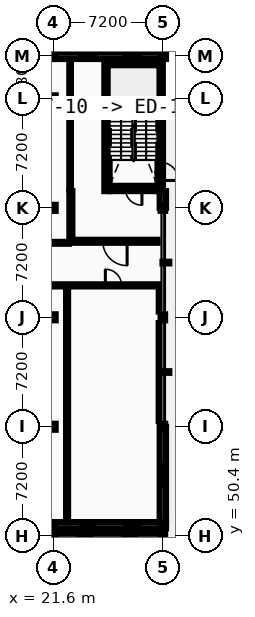
"""IFC4 building model, lengths in metres.
Left out: names, types, materials, properties, quantities, classifications, styles, units other than length and angle.
Written with IfcOpenShell. Run it as: python <this file> out.ifc"""

import sys

from ifc_helpers import new_model, si_unit, direction, frame, frame_2d, origin, origin_2d, place, context, subcontext, project, spatial, rectangle, i_section, extrude, element, fill, save


model = new_model("IFC4")
c1 = context("Model", 3, precision=1e-05, world=origin(), true_north=direction((0.0, 1.0)))
c2 = subcontext(c1, "Body", "Model", "MODEL_VIEW")
j1 = project(units=[si_unit("LENGTHUNIT", "METRE"), si_unit("PLANEANGLEUNIT", "RADIAN")], contexts=[c1])
p1 = place(None, origin())
s1 = spatial("IfcSite", under=j1, at=p1, CompositionType="ELEMENT")
p2 = place(p1, origin())
s2 = spatial("IfcBuilding", under=s1, at=p2, CompositionType="ELEMENT")
p3 = place(p2, origin())
s3 = spatial("IfcBuildingStorey", under=s2, at=p3, CompositionType="ELEMENT", Elevation=0.0)
p4 = place(p3, frame((21.6, 50.4, 0.0), z_axis=(0.0, 0.0, 1.0), x_axis=(1.0, 0.0, 0.0)))
e1 = element("IfcColumn", 1, at=p4, inside=s3, PredefinedType="COLUMN", context=c2, shape_type="SweptSolid", body=[
    extrude(i_section(OverallWidth=0.3, OverallDepth=0.45, WebThickness=0.014, FlangeThickness=0.026, FilletRadius=0.027, at=origin_2d()), origin(), (0.0, 0.0, 1.0), 5.2),
])
p5 = place(p3, frame((21.6, 51.12, 0.0), z_axis=(0.0, 0.0, 1.0), x_axis=(1.0, 0.0, 0.0)))
e2 = element("IfcColumn", 2, at=p5, inside=s3, PredefinedType="COLUMN", context=c2, shape_type="SweptSolid", body=[
    extrude(i_section(OverallWidth=0.3, OverallDepth=0.36, WebThickness=0.012, FlangeThickness=0.022, FilletRadius=0.027, at=origin_2d()), origin(), (0.0, 0.0, 1.0), 5.2),
])
for number, where, z_axis, x_axis in (
    (3, (21.6, 57.6, 0.0), (0.0, 0.0, 1.0), (1.0, 0.0, 0.0)),
    (4, (21.6, 64.8, 0.0), (0.0, 0.0, 1.0), (1.0, 0.0, 0.0)),
    (5, (21.6, 72.0, 0.0), (0.0, 0.0, 1.0), (1.0, 0.0, 0.0)),
    (6, (21.6, 79.2, 0.0), (0.0, 0.0, 1.0), (1.0, 0.0, 0.0)),
    (7, (21.6, 82.0, 0.0), (0.0, 0.0, 1.0), (1.0, 0.0, 0.0)),
):
    element("IfcColumn", number, at=place(p3, frame(where, z_axis=z_axis, x_axis=x_axis)), inside=s3, PredefinedType="COLUMN", context=c2, shape_type="SweptSolid", body=[
        extrude(i_section(OverallWidth=0.3, OverallDepth=0.4, WebThickness=0.013, FlangeThickness=0.024, FilletRadius=0.027, at=origin_2d()), origin(), (0.0, 0.0, 1.0), 5.2),
    ])
p6 = place(p3, frame((28.8, 50.4, 0.0), z_axis=(0.0, 0.0, 1.0), x_axis=(1.0, 0.0, 0.0)))
e8 = element("IfcColumn", 8, at=p6, inside=s3, PredefinedType="COLUMN", context=c2, shape_type="SweptSolid", body=[
    extrude(i_section(OverallWidth=0.3, OverallDepth=0.45, WebThickness=0.014, FlangeThickness=0.026, FilletRadius=0.027, at=origin_2d()), origin(), (0.0, 0.0, 1.0), 5.2),
])
p7 = place(p3, frame((28.8, 51.12, 0.0), z_axis=(0.0, 0.0, 1.0), x_axis=(1.0, 0.0, 0.0)))
e9 = element("IfcColumn", 9, at=p7, inside=s3, PredefinedType="COLUMN", context=c2, shape_type="SweptSolid", body=[
    extrude(i_section(OverallWidth=0.3, OverallDepth=0.36, WebThickness=0.012, FlangeThickness=0.022, FilletRadius=0.027, at=origin_2d()), origin(), (0.0, 0.0, 1.0), 5.2),
])
for number, where, z_axis, x_axis in (
    (10, (28.8, 57.6, 0.0), (0.0, 0.0, 1.0), (1.0, 0.0, 0.0)),
    (11, (28.8, 64.8, 0.0), (0.0, 0.0, 1.0), (1.0, 0.0, 0.0)),
    (12, (28.8, 72.0, 0.0), (0.0, 0.0, 1.0), (1.0, 0.0, 0.0)),
    (13, (28.8, 82.0, 0.0), (0.0, 0.0, 1.0), (1.0, 0.0, 0.0)),
):
    element("IfcColumn", number, at=place(p3, frame(where, z_axis=z_axis, x_axis=x_axis)), inside=s3, PredefinedType="COLUMN", context=c2, shape_type="SweptSolid", body=[
        extrude(i_section(OverallWidth=0.3, OverallDepth=0.4, WebThickness=0.013, FlangeThickness=0.024, FilletRadius=0.027, at=origin_2d()), origin(), (0.0, 0.0, 1.0), 5.2),
    ])
p8 = place(p3, frame((28.8, 50.4, 0.0), z_axis=(0.0, 0.0, 1.0), x_axis=(-1.0, 0.0, 0.0)))
e14 = element("IfcWall", 14, at=p8, inside=s3, PredefinedType="STANDARD", context=c2, shape_type="SweptSolid", body=[
    extrude(rectangle(XDim=7.31, YDim=0.42, at=frame_2d((3.655, 0.0))), origin(), (0.0, 0.0, 1.0), 4.665),
])
p9 = place(p8, frame((1.743, 0.0, 1.1)))
e15 = element("IfcOpeningElement", 15, at=p9, cuts=e14, PredefinedType="OPENING", context=c2, shape_type="SweptSolid", body=[
    extrude(rectangle(XDim=0.9, YDim=1.6, at=frame_2d((0.45, 0.8))), frame((0.0, 0.22, 0.0), z_axis=(0.0, -1.0, 0.0), x_axis=(1.0, 0.0, 0.0)), (0.0, 0.0, 1.0), 0.44),
])
p10 = place(p8, frame((4.667, 0.0, 1.1)))
e16 = element("IfcOpeningElement", 16, at=p10, cuts=e14, PredefinedType="OPENING", context=c2, shape_type="SweptSolid", body=[
    extrude(rectangle(XDim=0.9, YDim=1.6, at=frame_2d((0.45, 0.8))), frame((0.0, 0.22, 0.0), z_axis=(0.0, -1.0, 0.0), x_axis=(1.0, 0.0, 0.0)), (0.0, 0.0, 1.0), 0.44),
])
p11 = place(p3, frame((14.4, 51.12, 0.0), z_axis=(0.0, 0.0, 1.0), x_axis=(1.0, 0.0, 0.0)))
e17 = element("IfcWall", 17, at=p11, inside=s3, PredefinedType="STANDARD", context=c2, shape_type="SweptSolid", body=[
    extrude(rectangle(XDim=7.2, YDim=0.42, at=frame_2d((3.6, 0.0))), origin(), (0.0, 0.0, 1.0), 4.635),
])
p12 = place(p11, frame((1.679, 0.0, 0.95)))
e18 = element("IfcOpeningElement", 18, at=p12, cuts=e17, PredefinedType="OPENING", context=c2, shape_type="SweptSolid", body=[
    extrude(rectangle(XDim=0.962, YDim=1.404, at=frame_2d((0.481, 0.702))), frame((0.0, 0.22, 0.0), z_axis=(0.0, -1.0, 0.0), x_axis=(1.0, 0.0, 0.0)), (0.0, 0.0, 1.0), 0.44),
])
p13 = place(p11, frame((4.559, 0.0, 0.95)))
e19 = element("IfcOpeningElement", 19, at=p13, cuts=e17, PredefinedType="OPENING", context=c2, shape_type="SweptSolid", body=[
    extrude(rectangle(XDim=0.962, YDim=1.404, at=frame_2d((0.481, 0.702))), frame((0.0, 0.22, 0.0), z_axis=(0.0, -1.0, 0.0), x_axis=(1.0, 0.0, 0.0)), (0.0, 0.0, 1.0), 0.44),
])
p14 = place(p3, frame((21.6, 51.12, 0.0), z_axis=(0.0, 0.0, 1.0), x_axis=(1.0, 0.0, 0.0)))
e20 = element("IfcWall", 20, at=p14, inside=s3, PredefinedType="STANDARD", context=c2, shape_type="SweptSolid", body=[
    extrude(rectangle(XDim=7.41, YDim=0.42, at=frame_2d((3.705, 0.0))), origin(), (0.0, 0.0, 1.0), 4.635),
])
p15 = place(p14, frame((1.725, 0.0, 0.95)))
e21 = element("IfcOpeningElement", 21, at=p15, cuts=e20, PredefinedType="OPENING", context=c2, shape_type="SweptSolid", body=[
    extrude(rectangle(XDim=0.996, YDim=1.404, at=frame_2d((0.498, 0.702))), frame((0.0, 0.22, 0.0), z_axis=(0.0, -1.0, 0.0), x_axis=(1.0, 0.0, 0.0)), (0.0, 0.0, 1.0), 0.44),
])
p16 = place(p14, frame((4.689, 0.0, 0.95)))
e22 = element("IfcOpeningElement", 22, at=p16, cuts=e20, PredefinedType="OPENING", context=c2, shape_type="SweptSolid", body=[
    extrude(rectangle(XDim=0.996, YDim=1.404, at=frame_2d((0.498, 0.702))), frame((0.0, 0.22, 0.0), z_axis=(0.0, -1.0, 0.0), x_axis=(1.0, 0.0, 0.0)), (0.0, 0.0, 1.0), 0.44),
])
p17 = place(p3, frame((21.6, 82.0, 0.0), z_axis=(0.0, 0.0, 1.0), x_axis=(-1.0, 0.0, 0.0)))
e23 = element("IfcWall", 23, at=p17, inside=s3, PredefinedType="STANDARD", context=c2, shape_type="SweptSolid", body=[
    extrude(rectangle(XDim=7.2, YDim=0.42, at=frame_2d((3.6, 0.0))), origin(), (0.0, 0.0, 1.0), 4.635),
])
p18 = place(p17, frame((1.611, 0.0, 0.95)))
e24 = element("IfcOpeningElement", 24, at=p18, cuts=e23, PredefinedType="OPENING", context=c2, shape_type="SweptSolid", body=[
    extrude(rectangle(XDim=1.098, YDim=1.404, at=frame_2d((0.549, 0.702))), frame((0.0, 0.22, 0.0), z_axis=(0.0, -1.0, 0.0), x_axis=(1.0, 0.0, 0.0)), (0.0, 0.0, 1.0), 0.44),
])
p19 = place(p17, frame((4.491, 0.0, 0.95)))
e25 = element("IfcOpeningElement", 25, at=p19, cuts=e23, PredefinedType="OPENING", context=c2, shape_type="SweptSolid", body=[
    extrude(rectangle(XDim=1.098, YDim=1.404, at=frame_2d((0.549, 0.702))), frame((0.0, 0.22, 0.0), z_axis=(0.0, -1.0, 0.0), x_axis=(1.0, 0.0, 0.0)), (0.0, 0.0, 1.0), 0.44),
])
p20 = place(p3, frame((29.01, 82.0, 0.0), z_axis=(0.0, 0.0, 1.0), x_axis=(-1.0, 0.0, 0.0)))
e26 = element("IfcWall", 26, at=p20, inside=s3, PredefinedType="STANDARD", context=c2, shape_type="SweptSolid", body=[
    extrude(rectangle(XDim=7.41, YDim=0.42, at=frame_2d((3.705, 0.0))), origin(), (0.0, 0.0, 1.0), 4.635),
])
p21 = place(p20, frame((1.657, 0.0, 0.95)))
e27 = element("IfcOpeningElement", 27, at=p21, cuts=e26, PredefinedType="OPENING", context=c2, shape_type="SweptSolid", body=[
    extrude(rectangle(XDim=1.132, YDim=1.404, at=frame_2d((0.566, 0.702))), frame((0.0, 0.22, 0.0), z_axis=(0.0, -1.0, 0.0), x_axis=(1.0, 0.0, 0.0)), (0.0, 0.0, 1.0), 0.44),
])
p22 = place(p20, frame((4.621, 0.0, 0.95)))
e28 = element("IfcOpeningElement", 28, at=p22, cuts=e26, PredefinedType="OPENING", context=c2, shape_type="SweptSolid", body=[
    extrude(rectangle(XDim=1.132, YDim=1.404, at=frame_2d((0.566, 0.702))), frame((0.0, 0.22, 0.0), z_axis=(0.0, -1.0, 0.0), x_axis=(1.0, 0.0, 0.0)), (0.0, 0.0, 1.0), 0.44),
])
p23 = place(p3, frame((28.8, 51.33, 0.0), z_axis=(0.0, 0.0, 1.0), x_axis=(0.0, 1.0, 0.0)))
e29 = element("IfcWall", 29, at=p23, inside=s3, PredefinedType="STANDARD", context=c2, shape_type="SweptSolid", body=[
    extrude(rectangle(XDim=6.27, YDim=0.42, at=frame_2d((3.135, 0.0))), origin(), (0.0, 0.0, 1.0), 4.565),
])
p24 = place(p23, frame((2.385, 0.0, 1.05)))
e30 = element("IfcOpeningElement", 30, at=p24, cuts=e29, PredefinedType="OPENING", context=c2, shape_type="SweptSolid", body=[
    extrude(rectangle(XDim=1.5, YDim=1.5, at=frame_2d((0.75, 0.75))), frame((0.0, 0.22, 0.0), z_axis=(0.0, -1.0, 0.0), x_axis=(1.0, 0.0, 0.0)), (0.0, 0.0, 1.0), 0.44),
])
p25 = place(p3, frame((28.8, 72.0, 0.0), z_axis=(0.0, 0.0, 1.0), x_axis=(0.0, 1.0, 0.0)))
e31 = element("IfcWall", 31, at=p25, inside=s3, PredefinedType="STANDARD", context=c2, shape_type="SweptSolid", body=[
    extrude(rectangle(XDim=1.1, YDim=0.42, at=frame_2d((0.55, 0.0))), origin(), (0.0, 0.0, 1.0), 4.94),
])
p26 = place(p3, frame((25.3, 73.275, 0.0), z_axis=(0.0, 0.0, 1.0), x_axis=(1.0, 0.0, 0.0)))
e32 = element("IfcWall", 32, at=p26, inside=s3, PredefinedType="SHEAR", context=c2, shape_type="SweptSolid", body=[
    extrude(rectangle(XDim=3.15, YDim=0.35, at=frame_2d((1.575, 0.0))), origin(), (0.0, 0.0, 1.0), 4.94),
])
p27 = place(p26, frame((1.025, 0.0, 0.0)))
e33 = element("IfcOpeningElement", 33, at=p27, cuts=e32, PredefinedType="OPENING", context=c2, shape_type="SweptSolid", body=[
    extrude(rectangle(XDim=1.1, YDim=2.15, at=frame_2d((0.55, 1.075))), frame((0.0, 0.185, 0.0), z_axis=(0.0, -1.0, 0.0), x_axis=(1.0, 0.0, 0.0)), (0.0, 0.0, 1.0), 0.37),
])
p28 = place(p3, frame((25.3, 81.425, 0.0), z_axis=(0.0, 0.0, 1.0), x_axis=(1.0, 0.0, 0.0)))
e34 = element("IfcWall", 34, at=p28, inside=s3, PredefinedType="SHEAR", context=c2, shape_type="SweptSolid", body=[
    extrude(rectangle(XDim=3.15, YDim=0.35, at=frame_2d((1.575, 0.0))), origin(), (0.0, 0.0, 1.0), 4.94),
])
p29 = place(p3, frame((25.125, 73.1, 0.0), z_axis=(0.0, 0.0, 1.0), x_axis=(0.0, 1.0, 0.0)))
e35 = element("IfcWall", 35, at=p29, inside=s3, PredefinedType="SHEAR", context=c2, shape_type="SweptSolid", body=[
    extrude(rectangle(XDim=8.69, YDim=0.35, at=frame_2d((4.345, 0.0))), origin(), (0.0, 0.0, 1.0), 4.94),
])
p30 = place(p3, frame((28.625, 73.1, 0.0), z_axis=(0.0, 0.0, 1.0), x_axis=(0.0, 1.0, 0.0)))
e36 = element("IfcWall", 36, at=p30, inside=s3, PredefinedType="SHEAR", context=c2, shape_type="SweptSolid", body=[
    extrude(rectangle(XDim=8.69, YDim=0.35, at=frame_2d((4.345, 0.0))), origin(), (0.0, 0.0, 1.0), 4.94),
])
p31 = place(p30, frame((0.7, 0.0, 0.0)))
e37 = element("IfcOpeningElement", 37, at=p31, cuts=e36, PredefinedType="OPENING", context=c2, shape_type="SweptSolid", body=[
    extrude(rectangle(XDim=1.2, YDim=2.15, at=frame_2d((0.6, 1.075))), frame((0.0, 0.185, 0.0), z_axis=(0.0, -1.0, 0.0), x_axis=(1.0, 0.0, 0.0)), (0.0, 0.0, 1.0), 0.37),
])
p32 = place(p3, frame((22.85, 69.8, 0.0), z_axis=(0.0, 0.0, 1.0), x_axis=(1.0, 0.0, 0.0)))
e38 = element("IfcWall", 38, at=p32, inside=s3, PredefinedType="PARTITIONING", context=c2, shape_type="SweptSolid", body=[
    extrude(rectangle(XDim=5.6, YDim=0.2, at=frame_2d((2.8, 0.0))), origin(), (0.0, 0.0, 1.0), 4.94),
])
p33 = place(p32, frame((2.0, 0.0, 0.0)))
e39 = element("IfcOpeningElement", 39, at=p33, cuts=e38, PredefinedType="OPENING", context=c2, shape_type="SweptSolid", body=[
    extrude(rectangle(XDim=1.6, YDim=2.2, at=frame_2d((0.8, 1.1))), frame((0.0, 0.11, 0.0), z_axis=(0.0, -1.0, 0.0), x_axis=(1.0, 0.0, 0.0)), (0.0, 0.0, 1.0), 0.22),
])
p34 = place(p3, frame((22.75, 69.9, 0.0), z_axis=(0.0, 0.0, 1.0), x_axis=(0.0, 1.0, 0.0)))
e40 = element("IfcWall", 40, at=p34, inside=s3, PredefinedType="PARTITIONING", context=c2, shape_type="SweptSolid", body=[
    extrude(rectangle(XDim=3.2, YDim=0.2, at=frame_2d((1.6, 0.0))), origin(), (0.0, 0.0, 1.0), 4.94),
])
p35 = place(p3, frame((14.7, 66.9, 0.0), z_axis=(0.0, 0.0, 1.0), x_axis=(1.0, 0.0, 0.0)))
e41 = element("IfcWall", 41, at=p35, inside=s3, PredefinedType="PARTITIONING", context=c2, shape_type="SweptSolid", body=[
    extrude(rectangle(XDim=13.9, YDim=0.142, at=frame_2d((6.95, 0.0))), origin(), (0.0, 0.0, 1.0), 4.94),
])
p36 = place(p35, frame((10.319, 0.0, 0.0)))
e42 = element("IfcOpeningElement", 42, at=p36, cuts=e41, PredefinedType="OPENING", context=c2, shape_type="SweptSolid", body=[
    extrude(rectangle(XDim=1.062, YDim=2.096, at=frame_2d((0.531, 1.048))), frame((0.0, 0.081, 0.0), z_axis=(0.0, -1.0, 0.0), x_axis=(1.0, 0.0, 0.0)), (0.0, 0.0, 1.0), 0.162),
])
p37 = place(p35, frame((3.356, 0.0, 0.0)))
e43 = element("IfcOpeningElement", 43, at=p37, cuts=e41, PredefinedType="OPENING", context=c2, shape_type="SweptSolid", body=[
    extrude(rectangle(XDim=1.088, YDim=2.096, at=frame_2d((0.544, 1.048))), frame((0.0, 0.081, 0.0), z_axis=(0.0, -1.0, 0.0), x_axis=(1.0, 0.0, 0.0)), (0.0, 0.0, 1.0), 0.162),
])
p38 = place(p3, frame((6.45, 69.7, 0.0), z_axis=(0.0, 0.0, 1.0), x_axis=(1.0, 0.0, 0.0)))
e44 = element("IfcWall", 44, at=p38, inside=s3, PredefinedType="PARTITIONING", context=c2, shape_type="SweptSolid", body=[
    extrude(rectangle(XDim=16.18, YDim=0.125, at=frame_2d((8.09, 0.0))), origin(), (0.0, 0.0, 1.0), 4.94),
])
p39 = place(p38, frame((12.35, 0.0, 0.0)))
e45 = element("IfcOpeningElement", 45, at=p39, cuts=e44, PredefinedType="OPENING", context=c2, shape_type="SweptSolid", body=[
    extrude(rectangle(XDim=0.9, YDim=2.1, at=frame_2d((0.45, 1.05))), frame((0.0, 0.073, 0.0), z_axis=(0.0, -1.0, 0.0), x_axis=(1.0, 0.0, 0.0)), (0.0, 0.0, 1.0), 0.145),
])
p40 = place(p38, frame((9.95, 0.0, 0.0)))
e46 = element("IfcOpeningElement", 46, at=p40, cuts=e44, PredefinedType="OPENING", context=c2, shape_type="SweptSolid", body=[
    extrude(rectangle(XDim=1.5, YDim=2.2, at=frame_2d((0.75, 1.1))), frame((0.0, 0.073, 0.0), z_axis=(0.0, -1.0, 0.0), x_axis=(1.0, 0.0, 0.0)), (0.0, 0.0, 1.0), 0.145),
])
p41 = place(p38, frame((2.625, 0.0, 0.0)))
e47 = element("IfcOpeningElement", 47, at=p41, cuts=e44, PredefinedType="OPENING", context=c2, shape_type="SweptSolid", body=[
    extrude(rectangle(XDim=1.5, YDim=2.2, at=frame_2d((0.75, 1.1))), frame((0.0, 0.073, 0.0), z_axis=(0.0, -1.0, 0.0), x_axis=(1.0, 0.0, 0.0)), (0.0, 0.0, 1.0), 0.145),
])
p42 = place(p3, frame((22.5, 51.32, 0.0), z_axis=(0.0, 0.0, 1.0), x_axis=(0.0, 1.0, 0.0)))
e48 = element("IfcWall", 48, at=p42, inside=s3, PredefinedType="PARTITIONING", context=c2, shape_type="SweptSolid", body=[
    extrude(rectangle(XDim=15.509, YDim=0.135, at=frame_2d((7.754, 0.0))), origin(), (0.0, 0.0, 1.0), 4.94),
])
p43 = place(p3, frame((22.7, 73.2, 0.0), z_axis=(0.0, 0.0, 1.0), x_axis=(0.0, 1.0, 0.0)))
e49 = element("IfcWall", 49, at=p43, inside=s3, PredefinedType="PARTITIONING", context=c2, shape_type="SweptSolid", body=[
    extrude(rectangle(XDim=8.6, YDim=0.11, at=frame_2d((4.3, 0.0))), origin(), (0.0, 0.0, 1.0), 4.94),
])
p44 = place(p3, frame((28.6, 57.98, 0.0), z_axis=(0.0, 0.0, 1.0), x_axis=(0.0, 1.0, 0.0)))
e50 = element("IfcWall", 50, at=p44, inside=s3, PredefinedType="PARTITIONING", context=c2, shape_type="SweptSolid", body=[
    extrude(rectangle(XDim=6.44, YDim=0.15, at=frame_2d((3.22, 0.0))), origin(), (0.0, 0.0, 1.0), 4.565),
])
p45 = place(p3, frame((28.6, 65.18, 0.0), z_axis=(0.0, 0.0, 1.0), x_axis=(0.0, 1.0, 0.0)))
e51 = element("IfcWall", 51, at=p45, inside=s3, PredefinedType="PARTITIONING", context=c2, shape_type="SweptSolid", body=[
    extrude(rectangle(XDim=1.649, YDim=0.142, at=frame_2d((0.825, 0.0))), origin(), (0.0, 0.0, 1.0), 4.565),
])
p46 = place(p9, origin())
e52 = element("IfcWindow", 52, at=p46, inside=s3, PartitioningType="SINGLE_PANEL", PredefinedType="WINDOW", context=c2, shape_type="SweptSolid", body=[
    extrude(rectangle(XDim=0.9, YDim=1.6, at=frame_2d((0.45, 0.8))), frame((0.0, 0.03, 0.0), z_axis=(0.0, -1.0, 0.0), x_axis=(1.0, 0.0, 0.0)), (0.0, 0.0, 1.0), 0.06),
])
fill(e15, e52)
p47 = place(p10, origin())
e53 = element("IfcWindow", 53, at=p47, inside=s3, PartitioningType="SINGLE_PANEL", PredefinedType="WINDOW", context=c2, shape_type="SweptSolid", body=[
    extrude(rectangle(XDim=0.9, YDim=1.6, at=frame_2d((0.45, 0.8))), frame((0.0, 0.03, 0.0), z_axis=(0.0, -1.0, 0.0), x_axis=(1.0, 0.0, 0.0)), (0.0, 0.0, 1.0), 0.06),
])
fill(e16, e53)
p48 = place(p15, origin())
e54 = element("IfcWindow", 54, at=p48, inside=s3, PartitioningType="SINGLE_PANEL", PredefinedType="WINDOW", context=c2, shape_type="SweptSolid", body=[
    extrude(rectangle(XDim=0.996, YDim=1.404, at=frame_2d((0.498, 0.702))), frame((0.0, 0.03, 0.0), z_axis=(0.0, -1.0, 0.0), x_axis=(1.0, 0.0, 0.0)), (0.0, 0.0, 1.0), 0.06),
])
fill(e21, e54)
p49 = place(p16, origin())
e55 = element("IfcWindow", 55, at=p49, inside=s3, PartitioningType="SINGLE_PANEL", PredefinedType="WINDOW", context=c2, shape_type="SweptSolid", body=[
    extrude(rectangle(XDim=0.996, YDim=1.404, at=frame_2d((0.498, 0.702))), frame((0.0, 0.03, 0.0), z_axis=(0.0, -1.0, 0.0), x_axis=(1.0, 0.0, 0.0)), (0.0, 0.0, 1.0), 0.06),
])
fill(e22, e55)
p50 = place(p21, origin())
e56 = element("IfcWindow", 56, at=p50, inside=s3, PartitioningType="SINGLE_PANEL", PredefinedType="WINDOW", context=c2, shape_type="SweptSolid", body=[
    extrude(rectangle(XDim=1.132, YDim=1.404, at=frame_2d((0.566, 0.702))), frame((0.0, 0.03, 0.0), z_axis=(0.0, -1.0, 0.0), x_axis=(1.0, 0.0, 0.0)), (0.0, 0.0, 1.0), 0.06),
])
fill(e27, e56)
p51 = place(p22, origin())
e57 = element("IfcWindow", 57, at=p51, inside=s3, PartitioningType="SINGLE_PANEL", PredefinedType="WINDOW", context=c2, shape_type="SweptSolid", body=[
    extrude(rectangle(XDim=1.132, YDim=1.404, at=frame_2d((0.566, 0.702))), frame((0.0, 0.03, 0.0), z_axis=(0.0, -1.0, 0.0), x_axis=(1.0, 0.0, 0.0)), (0.0, 0.0, 1.0), 0.06),
])
fill(e28, e57)
p52 = place(p24, origin())
e58 = element("IfcWindow", 58, at=p52, inside=s3, PartitioningType="SINGLE_PANEL", PredefinedType="WINDOW", context=c2, shape_type="SweptSolid", body=[
    extrude(rectangle(XDim=1.5, YDim=1.5, at=frame_2d((0.75, 0.75))), frame((0.0, 0.03, 0.0), z_axis=(0.0, -1.0, 0.0), x_axis=(1.0, 0.0, 0.0)), (0.0, 0.0, 1.0), 0.06),
])
fill(e30, e58)
p53 = place(p27, origin())
e59 = element("IfcDoor", 59, at=p53, inside=s3, OperationType="SINGLE_SWING_RIGHT", PredefinedType="DOOR", context=c2, shape_type="SweptSolid", body=[
    extrude(rectangle(XDim=1.1, YDim=2.15, at=frame_2d((0.55, 1.075))), frame((0.0, 0.025, 0.0), z_axis=(0.0, -1.0, 0.0), x_axis=(1.0, 0.0, 0.0)), (0.0, 0.0, 1.0), 0.05),
])
fill(e33, e59)
p54 = place(p31, frame((1.2, 0.0, 0.0), z_axis=(0.0, 0.0, 1.0), x_axis=(-1.0, 0.0, 0.0)))
e60 = element("IfcDoor", 60, at=p54, inside=s3, OperationType="SINGLE_SWING_LEFT", PredefinedType="DOOR", context=c2, shape_type="SweptSolid", body=[
    extrude(rectangle(XDim=1.2, YDim=2.15, at=frame_2d((0.6, 1.075))), frame((0.0, 0.025, 0.0), z_axis=(0.0, -1.0, 0.0), x_axis=(1.0, 0.0, 0.0)), (0.0, 0.0, 1.0), 0.05),
])
fill(e37, e60)
p55 = place(p33, origin())
e61 = element("IfcDoor", 61, at=p55, inside=s3, OperationType="DOUBLE_DOOR_SINGLE_SWING", PredefinedType="DOOR", context=c2, shape_type="SweptSolid", body=[
    extrude(rectangle(XDim=1.6, YDim=2.2, at=frame_2d((0.8, 1.1))), frame((0.0, 0.025, 0.0), z_axis=(0.0, -1.0, 0.0), x_axis=(1.0, 0.0, 0.0)), (0.0, 0.0, 1.0), 0.05),
])
fill(e39, e61)
p56 = place(p36, origin())
e62 = element("IfcDoor", 62, at=p56, inside=s3, OperationType="SINGLE_SWING_LEFT", PredefinedType="DOOR", context=c2, shape_type="SweptSolid", body=[
    extrude(rectangle(XDim=1.062, YDim=2.096, at=frame_2d((0.531, 1.048))), frame((0.0, 0.025, 0.0), z_axis=(0.0, -1.0, 0.0), x_axis=(1.0, 0.0, 0.0)), (0.0, 0.0, 1.0), 0.05),
])
fill(e42, e62)
save(model, sys.argv[1])
